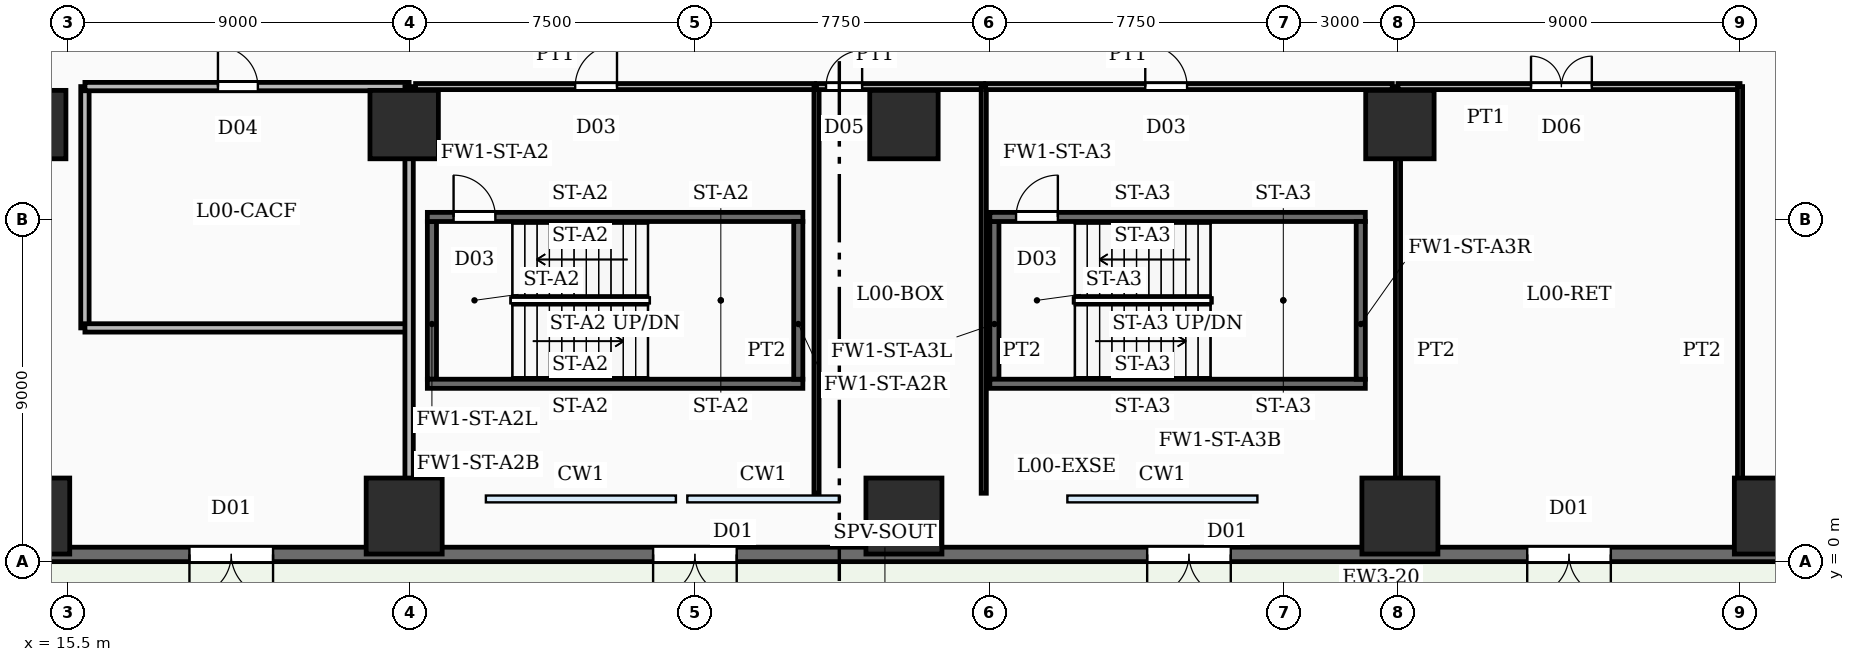
"""IFC4 building model, lengths in metres.
Left out: names, types, materials, properties, quantities, classifications, styles, units other than length and angle.
Written with IfcOpenShell. Run it as: python <this file> out.ifc"""

import sys

from ifc_helpers import new_model, si_unit, direction, frame, frame_2d, origin, origin_2d, place, context, subcontext, project, spatial, rectangle, circle, extrude, element, fill, save


model = new_model("IFC4")
c1 = context("Model", 3, precision=1e-05, world=origin(), true_north=direction((0.0, 1.0)))
c2 = subcontext(c1, "Body", "Model", "MODEL_VIEW")
j1 = project(units=[si_unit("LENGTHUNIT", "METRE"), si_unit("PLANEANGLEUNIT", "RADIAN")], contexts=[c1])
p1 = place(None, origin())
s1 = spatial("IfcSite", under=j1, at=p1, CompositionType="ELEMENT")
p2 = place(p1, origin())
s2 = spatial("IfcBuilding", under=s1, at=p2, CompositionType="ELEMENT")
p3 = place(p2, origin())
s3 = spatial("IfcBuildingStorey", under=s2, at=p3, CompositionType="ELEMENT", Elevation=0.0)
for number, where, z_axis, x_axis in (
    (1, (14.55, 1.2, -0.45), (0.0, 0.0, 1.0), (1.0, 0.0, 0.0)),
    (2, (24.35, 1.2, -0.45), (0.0, 0.0, 1.0), (1.0, 0.0, 0.0)),
    (3, (37.5, 1.2, -0.45), (0.0, 0.0, 1.0), (1.0, 0.0, 0.0)),
    (4, (50.55, 1.2, -0.45), (0.0, 0.0, 1.0), (1.0, 0.0, 0.0)),
    (5, (60.35, 1.2, -0.45), (0.0, 0.0, 1.0), (1.0, 0.0, 0.0)),
):
    element("IfcColumn", number, at=place(p3, frame(where, z_axis=z_axis, x_axis=x_axis)), inside=s3, PredefinedType="COLUMN", context=c2, shape_type="SweptSolid", body=[
        extrude(circle(Radius=1.0, at=origin_2d()), origin(), (0.0, 0.0, 1.0), 8.1),
    ])
for number, where, z_axis, x_axis in (
    (6, (14.55, 11.5, -0.45), (0.0, 0.0, 1.0), (1.0, 0.0, 0.0)),
    (7, (24.35, 11.5, -0.45), (0.0, 0.0, 1.0), (1.0, 0.0, 0.0)),
    (8, (37.5, 11.5, -0.45), (0.0, 0.0, 1.0), (1.0, 0.0, 0.0)),
    (9, (50.55, 11.5, -0.45), (0.0, 0.0, 1.0), (1.0, 0.0, 0.0)),
):
    element("IfcColumn", number, at=place(p3, frame(where, z_axis=z_axis, x_axis=x_axis)), inside=s3, PredefinedType="COLUMN", context=c2, shape_type="SweptSolid", body=[
        extrude(circle(Radius=0.9, at=origin_2d()), origin(), (0.0, 0.0, 1.0), 8.1),
    ])
p4 = place(p3, frame((74.1, 0.19, 0.0), z_axis=(0.0, 0.0, 1.0), x_axis=(-1.0, 0.0, 0.0)))
e10 = element("IfcWall", 10, at=p4, inside=s3, PredefinedType="SOLIDWALL", context=c2, shape_type="SweptSolid", body=[
    extrude(rectangle(XDim=68.7, YDim=0.38, at=frame_2d((34.35, 0.0))), origin(), (0.0, 0.0, 1.0), 7.65),
])
p5 = place(p4, frame((53.2, 0.0, 0.0)))
e11 = element("IfcOpeningElement", 11, at=p5, cuts=e10, PredefinedType="OPENING", context=c2, shape_type="SweptSolid", body=[
    extrude(rectangle(XDim=2.2, YDim=2.4, at=frame_2d((1.1, 1.2))), frame((0.0, 0.2, 0.0), z_axis=(0.0, -1.0, 0.0), x_axis=(1.0, 0.0, 0.0)), (0.0, 0.0, 1.0), 0.4),
])
p6 = place(p4, frame((41.0, 0.0, 0.0)))
e12 = element("IfcOpeningElement", 12, at=p6, cuts=e10, PredefinedType="OPENING", context=c2, shape_type="SweptSolid", body=[
    extrude(rectangle(XDim=2.2, YDim=2.4, at=frame_2d((1.1, 1.2))), frame((0.0, 0.2, 0.0), z_axis=(0.0, -1.0, 0.0), x_axis=(1.0, 0.0, 0.0)), (0.0, 0.0, 1.0), 0.4),
])
p7 = place(p4, frame((28.0, 0.0, 0.0)))
e13 = element("IfcOpeningElement", 13, at=p7, cuts=e10, PredefinedType="OPENING", context=c2, shape_type="SweptSolid", body=[
    extrude(rectangle(XDim=2.2, YDim=2.4, at=frame_2d((1.1, 1.2))), frame((0.0, 0.2, 0.0), z_axis=(0.0, -1.0, 0.0), x_axis=(1.0, 0.0, 0.0)), (0.0, 0.0, 1.0), 0.4),
])
p8 = place(p4, frame((18.0, 0.0, 0.0)))
e14 = element("IfcOpeningElement", 14, at=p8, cuts=e10, PredefinedType="OPENING", context=c2, shape_type="SweptSolid", body=[
    extrude(rectangle(XDim=2.2, YDim=2.4, at=frame_2d((1.1, 1.2))), frame((0.0, 0.2, 0.0), z_axis=(0.0, -1.0, 0.0), x_axis=(1.0, 0.0, 0.0)), (0.0, 0.0, 1.0), 0.4),
])
p9 = place(p4, frame((9.5, 0.0, 0.0)))
e15 = element("IfcOpeningElement", 15, at=p9, cuts=e10, PredefinedType="OPENING", context=c2, shape_type="SweptSolid", body=[
    extrude(rectangle(XDim=2.2, YDim=2.4, at=frame_2d((1.1, 1.2))), frame((0.0, 0.2, 0.0), z_axis=(0.0, -1.0, 0.0), x_axis=(1.0, 0.0, 0.0)), (0.0, 0.0, 1.0), 0.4),
])
p10 = place(p3, frame((24.96, 9.07, 0.0), z_axis=(0.0, 0.0, 1.0), x_axis=(1.0, 0.0, 0.0)))
e16 = element("IfcWall", 16, at=p10, inside=s3, PredefinedType="SOLIDWALL", context=c2, shape_type="SweptSolid", body=[
    extrude(rectangle(XDim=9.88, YDim=0.24, at=frame_2d((4.94, 0.0))), origin(), (0.0, 0.0, 1.0), 7.65),
])
p11 = place(p10, frame((0.69, 0.0, 0.0)))
e17 = element("IfcOpeningElement", 17, at=p11, cuts=e16, PredefinedType="OPENING", context=c2, shape_type="SweptSolid", body=[
    extrude(rectangle(XDim=1.1, YDim=2.15, at=frame_2d((0.55, 1.075))), frame((0.0, 0.13, 0.0), z_axis=(0.0, -1.0, 0.0), x_axis=(1.0, 0.0, 0.0)), (0.0, 0.0, 1.0), 0.26),
])
p12 = place(p3, frame((24.96, 4.68, 0.0), z_axis=(0.0, 0.0, 1.0), x_axis=(1.0, 0.0, 0.0)))
e18 = element("IfcWall", 18, at=p12, inside=s3, PredefinedType="SOLIDWALL", context=c2, shape_type="SweptSolid", body=[
    extrude(rectangle(XDim=9.88, YDim=0.24, at=frame_2d((4.94, 0.0))), origin(), (0.0, 0.0, 1.0), 7.65),
])
for number, where, z_axis, x_axis in (
    (19, (25.08, 4.8, 0.0), (0.0, 0.0, 1.0), (0.0, 1.0, 0.0)),
    (20, (34.72, 4.8, 0.0), (0.0, 0.0, 1.0), (0.0, 1.0, 0.0)),
):
    element("IfcWall", number, at=place(p3, frame(where, z_axis=z_axis, x_axis=x_axis)), inside=s3, PredefinedType="SOLIDWALL", context=c2, shape_type="SweptSolid", body=[
        extrude(rectangle(XDim=4.15, YDim=0.24, at=frame_2d((2.075, 0.0))), origin(), (0.0, 0.0, 1.0), 7.65),
    ])
p13 = place(p3, frame((39.76, 9.07, 0.0), z_axis=(0.0, 0.0, 1.0), x_axis=(1.0, 0.0, 0.0)))
e21 = element("IfcWall", 21, at=p13, inside=s3, PredefinedType="SOLIDWALL", context=c2, shape_type="SweptSolid", body=[
    extrude(rectangle(XDim=9.88, YDim=0.24, at=frame_2d((4.94, 0.0))), origin(), (0.0, 0.0, 1.0), 7.65),
])
p14 = place(p13, frame((0.69, 0.0, 0.0)))
e22 = element("IfcOpeningElement", 22, at=p14, cuts=e21, PredefinedType="OPENING", context=c2, shape_type="SweptSolid", body=[
    extrude(rectangle(XDim=1.1, YDim=2.15, at=frame_2d((0.55, 1.075))), frame((0.0, 0.13, 0.0), z_axis=(0.0, -1.0, 0.0), x_axis=(1.0, 0.0, 0.0)), (0.0, 0.0, 1.0), 0.26),
])
p15 = place(p3, frame((39.76, 4.68, 0.0), z_axis=(0.0, 0.0, 1.0), x_axis=(1.0, 0.0, 0.0)))
e23 = element("IfcWall", 23, at=p15, inside=s3, PredefinedType="SOLIDWALL", context=c2, shape_type="SweptSolid", body=[
    extrude(rectangle(XDim=9.88, YDim=0.24, at=frame_2d((4.94, 0.0))), origin(), (0.0, 0.0, 1.0), 7.65),
])
for number, where, z_axis, x_axis in (
    (24, (39.88, 4.8, 0.0), (0.0, 0.0, 1.0), (0.0, 1.0, 0.0)),
    (25, (49.52, 4.8, 0.0), (0.0, 0.0, 1.0), (0.0, 1.0, 0.0)),
):
    element("IfcWall", number, at=place(p3, frame(where, z_axis=z_axis, x_axis=x_axis)), inside=s3, PredefinedType="SOLIDWALL", context=c2, shape_type="SweptSolid", body=[
        extrude(rectangle(XDim=4.15, YDim=0.24, at=frame_2d((2.075, 0.0))), origin(), (0.0, 0.0, 1.0), 7.65),
    ])
p16 = place(p3, frame((24.65, 12.5, 0.0), z_axis=(0.0, 0.0, 1.0), x_axis=(1.0, 0.0, 0.0)))
e26 = element("IfcWall", 26, at=p16, inside=s3, PredefinedType="PARTITIONING", context=c2, shape_type="SweptSolid", body=[
    extrude(rectangle(XDim=10.5, YDim=0.16, at=frame_2d((5.25, 0.0))), origin(), (0.0, 0.0, 1.0), 6.71),
])
p17 = place(p16, frame((4.2, 0.0, 0.0)))
e27 = element("IfcOpeningElement", 27, at=p17, cuts=e26, PredefinedType="OPENING", context=c2, shape_type="SweptSolid", body=[
    extrude(rectangle(XDim=1.1, YDim=2.15, at=frame_2d((0.55, 1.075))), frame((0.0, 0.09, 0.0), z_axis=(0.0, -1.0, 0.0), x_axis=(1.0, 0.0, 0.0)), (0.0, 0.0, 1.0), 0.18),
])
p18 = place(p3, frame((39.65, 12.5, 0.0), z_axis=(0.0, 0.0, 1.0), x_axis=(1.0, 0.0, 0.0)))
e28 = element("IfcWall", 28, at=p18, inside=s3, PredefinedType="PARTITIONING", context=c2, shape_type="SweptSolid", body=[
    extrude(rectangle(XDim=10.7, YDim=0.16, at=frame_2d((5.35, 0.0))), origin(), (0.0, 0.0, 1.0), 6.71),
])
p19 = place(p18, frame((4.2, 0.0, 0.0)))
e29 = element("IfcOpeningElement", 29, at=p19, cuts=e28, PredefinedType="OPENING", context=c2, shape_type="SweptSolid", body=[
    extrude(rectangle(XDim=1.1, YDim=2.15, at=frame_2d((0.55, 1.075))), frame((0.0, 0.09, 0.0), z_axis=(0.0, -1.0, 0.0), x_axis=(1.0, 0.0, 0.0)), (0.0, 0.0, 1.0), 0.18),
])
p20 = place(p3, frame((15.95, 12.5, 0.0), z_axis=(0.0, 0.0, 1.0), x_axis=(1.0, 0.0, 0.0)))
e30 = element("IfcWall", 30, at=p20, inside=s3, PredefinedType="SOLIDWALL", context=c2, shape_type="SweptSolid", body=[
    extrude(rectangle(XDim=8.53, YDim=0.22, at=frame_2d((4.265, 0.0))), origin(), (0.0, 0.0, 1.0), 6.71),
])
p21 = place(p20, frame((3.5, 0.0, 0.0)))
e31 = element("IfcOpeningElement", 31, at=p21, cuts=e30, PredefinedType="OPENING", context=c2, shape_type="SweptSolid", body=[
    extrude(rectangle(XDim=1.05, YDim=2.15, at=frame_2d((0.525, 1.075))), frame((0.0, 0.12, 0.0), z_axis=(0.0, -1.0, 0.0), x_axis=(1.0, 0.0, 0.0)), (0.0, 0.0, 1.0), 0.24),
])
p22 = place(p3, frame((15.95, 6.15, 0.0), z_axis=(0.0, 0.0, 1.0), x_axis=(1.0, 0.0, 0.0)))
e32 = element("IfcWall", 32, at=p22, inside=s3, PredefinedType="SOLIDWALL", context=c2, shape_type="SweptSolid", body=[
    extrude(rectangle(XDim=8.53, YDim=0.22, at=frame_2d((4.265, 0.0))), origin(), (0.0, 0.0, 1.0), 6.71),
])
p23 = place(p3, frame((15.95, 6.15, 0.0), z_axis=(0.0, 0.0, 1.0), x_axis=(0.0, 1.0, 0.0)))
e33 = element("IfcWall", 33, at=p23, inside=s3, PredefinedType="SOLIDWALL", context=c2, shape_type="SweptSolid", body=[
    extrude(rectangle(XDim=6.35, YDim=0.22, at=frame_2d((3.175, 0.0))), origin(), (0.0, 0.0, 1.0), 6.71),
])
p24 = place(p3, frame((24.48, 0.4, 0.0), z_axis=(0.0, 0.0, 1.0), x_axis=(0.0, 1.0, 0.0)))
e34 = element("IfcWall", 34, at=p24, inside=s3, PredefinedType="SOLIDWALL", context=c2, shape_type="SweptSolid", body=[
    extrude(rectangle(XDim=12.1, YDim=0.22, at=frame_2d((6.05, 0.0))), origin(), (0.0, 0.0, 1.0), 6.71),
])
p25 = place(p3, frame((35.2, 12.5, 0.0), z_axis=(0.0, 0.0, 1.0), x_axis=(1.0, 0.0, 0.0)))
e35 = element("IfcWall", 35, at=p25, inside=s3, PredefinedType="PARTITIONING", context=c2, shape_type="SweptSolid", body=[
    extrude(rectangle(XDim=4.4, YDim=0.16, at=frame_2d((2.2, 0.0))), origin(), (0.0, 0.0, 1.0), 6.71),
])
p26 = place(p25, frame((0.25, 0.0, 0.0)))
e36 = element("IfcOpeningElement", 36, at=p26, cuts=e35, PredefinedType="OPENING", context=c2, shape_type="SweptSolid", body=[
    extrude(rectangle(XDim=0.95, YDim=2.15, at=frame_2d((0.475, 1.075))), frame((0.0, 0.09, 0.0), z_axis=(0.0, -1.0, 0.0), x_axis=(1.0, 0.0, 0.0)), (0.0, 0.0, 1.0), 0.18),
])
for number, where, z_axis, x_axis in (
    (37, (35.2, 1.8, 0.0), (0.0, 0.0, 1.0), (0.0, 1.0, 0.0)),
    (38, (39.6, 1.8, 0.0), (0.0, 0.0, 1.0), (0.0, 1.0, 0.0)),
):
    element("IfcWall", number, at=place(p3, frame(where, z_axis=z_axis, x_axis=x_axis)), inside=s3, PredefinedType="PARTITIONING", context=c2, shape_type="SweptSolid", body=[
        extrude(rectangle(XDim=10.7, YDim=0.135, at=frame_2d((5.35, 0.0))), origin(), (0.0, 0.0, 1.0), 6.71),
    ])
p27 = place(p3, frame((50.5, 12.5, 0.0), z_axis=(0.0, 0.0, 1.0), x_axis=(1.0, 0.0, 0.0)))
e39 = element("IfcWall", 39, at=p27, inside=s3, PredefinedType="PARTITIONING", context=c2, shape_type="SweptSolid", body=[
    extrude(rectangle(XDim=9.0, YDim=0.16, at=frame_2d((4.5, 0.0))), origin(), (0.0, 0.0, 1.0), 6.71),
])
p28 = place(p27, frame((3.5, 0.0, 0.0)))
e40 = element("IfcOpeningElement", 40, at=p28, cuts=e39, PredefinedType="OPENING", context=c2, shape_type="SweptSolid", body=[
    extrude(rectangle(XDim=1.6, YDim=2.15, at=frame_2d((0.8, 1.075))), frame((0.0, 0.09, 0.0), z_axis=(0.0, -1.0, 0.0), x_axis=(1.0, 0.0, 0.0)), (0.0, 0.0, 1.0), 0.18),
])
for number, where, z_axis, x_axis in (
    (41, (50.5, 1.8, 0.0), (0.0, 0.0, 1.0), (0.0, 1.0, 0.0)),
    (42, (59.5, 1.8, 0.0), (0.0, 0.0, 1.0), (0.0, 1.0, 0.0)),
):
    element("IfcWall", number, at=place(p3, frame(where, z_axis=z_axis, x_axis=x_axis)), inside=s3, PredefinedType="PARTITIONING", context=c2, shape_type="SweptSolid", body=[
        extrude(rectangle(XDim=10.7, YDim=0.135, at=frame_2d((5.35, 0.0))), origin(), (0.0, 0.0, 1.0), 6.71),
    ])
p29 = place(p5, origin())
e43 = element("IfcDoor", 43, at=p29, inside=s3, OperationType="DOUBLE_DOOR_SINGLE_SWING", PredefinedType="DOOR", context=c2, shape_type="SweptSolid", body=[
    extrude(rectangle(XDim=2.2, YDim=2.4, at=frame_2d((1.1, 1.2))), frame((0.0, 0.025, 0.0), z_axis=(0.0, -1.0, 0.0), x_axis=(1.0, 0.0, 0.0)), (0.0, 0.0, 1.0), 0.05),
])
fill(e11, e43)
p30 = place(p6, origin())
e44 = element("IfcDoor", 44, at=p30, inside=s3, OperationType="DOUBLE_DOOR_SINGLE_SWING", PredefinedType="DOOR", context=c2, shape_type="SweptSolid", body=[
    extrude(rectangle(XDim=2.2, YDim=2.4, at=frame_2d((1.1, 1.2))), frame((0.0, 0.025, 0.0), z_axis=(0.0, -1.0, 0.0), x_axis=(1.0, 0.0, 0.0)), (0.0, 0.0, 1.0), 0.05),
])
fill(e12, e44)
p31 = place(p7, origin())
e45 = element("IfcDoor", 45, at=p31, inside=s3, OperationType="DOUBLE_DOOR_SINGLE_SWING", PredefinedType="DOOR", context=c2, shape_type="SweptSolid", body=[
    extrude(rectangle(XDim=2.2, YDim=2.4, at=frame_2d((1.1, 1.2))), frame((0.0, 0.025, 0.0), z_axis=(0.0, -1.0, 0.0), x_axis=(1.0, 0.0, 0.0)), (0.0, 0.0, 1.0), 0.05),
])
fill(e13, e45)
p32 = place(p8, origin())
e46 = element("IfcDoor", 46, at=p32, inside=s3, OperationType="DOUBLE_DOOR_SINGLE_SWING", PredefinedType="DOOR", context=c2, shape_type="SweptSolid", body=[
    extrude(rectangle(XDim=2.2, YDim=2.4, at=frame_2d((1.1, 1.2))), frame((0.0, 0.025, 0.0), z_axis=(0.0, -1.0, 0.0), x_axis=(1.0, 0.0, 0.0)), (0.0, 0.0, 1.0), 0.05),
])
fill(e14, e46)
p33 = place(p11, origin())
e47 = element("IfcDoor", 47, at=p33, inside=s3, OperationType="SINGLE_SWING_LEFT", PredefinedType="DOOR", context=c2, shape_type="SweptSolid", body=[
    extrude(rectangle(XDim=1.1, YDim=2.15, at=frame_2d((0.55, 1.075))), frame((0.0, 0.025, 0.0), z_axis=(0.0, -1.0, 0.0), x_axis=(1.0, 0.0, 0.0)), (0.0, 0.0, 1.0), 0.05),
])
fill(e17, e47)
p34 = place(p14, origin())
e48 = element("IfcDoor", 48, at=p34, inside=s3, OperationType="SINGLE_SWING_RIGHT", PredefinedType="DOOR", context=c2, shape_type="SweptSolid", body=[
    extrude(rectangle(XDim=1.1, YDim=2.15, at=frame_2d((0.55, 1.075))), frame((0.0, 0.025, 0.0), z_axis=(0.0, -1.0, 0.0), x_axis=(1.0, 0.0, 0.0)), (0.0, 0.0, 1.0), 0.05),
])
fill(e22, e48)
p35 = place(p17, origin())
e49 = element("IfcDoor", 49, at=p35, inside=s3, OperationType="SINGLE_SWING_RIGHT", PredefinedType="DOOR", context=c2, shape_type="SweptSolid", body=[
    extrude(rectangle(XDim=1.1, YDim=2.15, at=frame_2d((0.55, 1.075))), frame((0.0, 0.025, 0.0), z_axis=(0.0, -1.0, 0.0), x_axis=(1.0, 0.0, 0.0)), (0.0, 0.0, 1.0), 0.05),
])
fill(e27, e49)
p36 = place(p19, origin())
e50 = element("IfcDoor", 50, at=p36, inside=s3, OperationType="SINGLE_SWING_LEFT", PredefinedType="DOOR", context=c2, shape_type="SweptSolid", body=[
    extrude(rectangle(XDim=1.1, YDim=2.15, at=frame_2d((0.55, 1.075))), frame((0.0, 0.025, 0.0), z_axis=(0.0, -1.0, 0.0), x_axis=(1.0, 0.0, 0.0)), (0.0, 0.0, 1.0), 0.05),
])
fill(e29, e50)
p37 = place(p21, origin())
e51 = element("IfcDoor", 51, at=p37, inside=s3, OperationType="SINGLE_SWING_LEFT", PredefinedType="DOOR", context=c2, shape_type="SweptSolid", body=[
    extrude(rectangle(XDim=1.05, YDim=2.15, at=frame_2d((0.525, 1.075))), frame((0.0, 0.025, 0.0), z_axis=(0.0, -1.0, 0.0), x_axis=(1.0, 0.0, 0.0)), (0.0, 0.0, 1.0), 0.05),
])
fill(e31, e51)
p38 = place(p26, origin())
e52 = element("IfcDoor", 52, at=p38, inside=s3, OperationType="SINGLE_SWING_RIGHT", PredefinedType="DOOR", context=c2, shape_type="SweptSolid", body=[
    extrude(rectangle(XDim=0.95, YDim=2.15, at=frame_2d((0.475, 1.075))), frame((0.0, 0.025, 0.0), z_axis=(0.0, -1.0, 0.0), x_axis=(1.0, 0.0, 0.0)), (0.0, 0.0, 1.0), 0.05),
])
fill(e36, e52)
p39 = place(p28, origin())
e53 = element("IfcDoor", 53, at=p39, inside=s3, OperationType="DOUBLE_DOOR_SINGLE_SWING", PredefinedType="DOOR", context=c2, shape_type="SweptSolid", body=[
    extrude(rectangle(XDim=1.6, YDim=2.15, at=frame_2d((0.8, 1.075))), frame((0.0, 0.025, 0.0), z_axis=(0.0, -1.0, 0.0), x_axis=(1.0, 0.0, 0.0)), (0.0, 0.0, 1.0), 0.05),
])
fill(e40, e53)
save(model, sys.argv[1])
